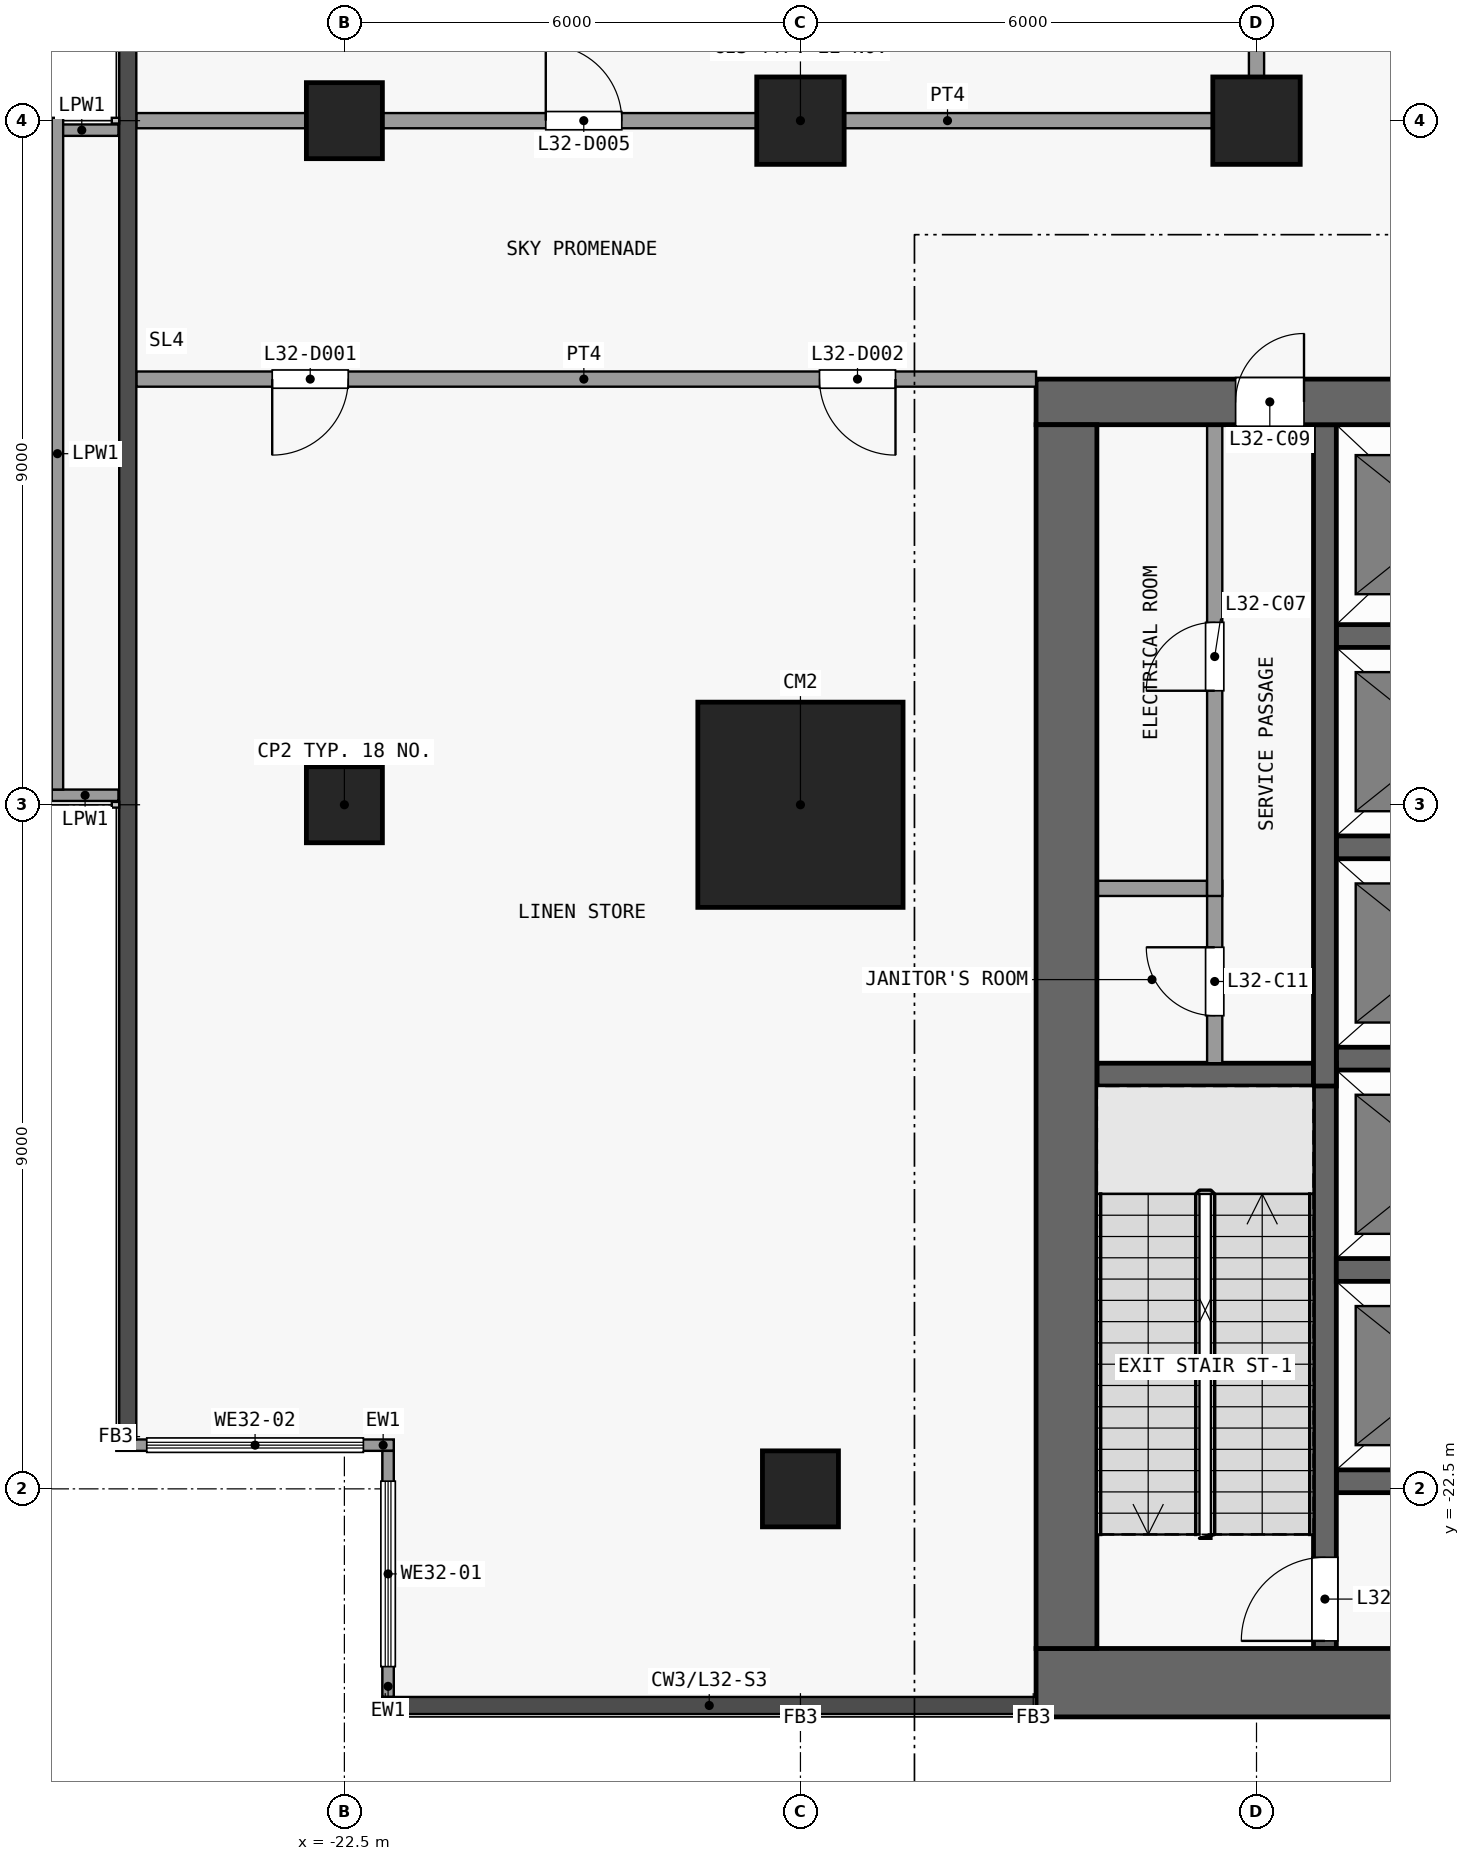
"""IFC4 building model, lengths in metres.
Left out: names, types, materials, properties, quantities, classifications, styles, units other than length and angle.
Written with IfcOpenShell. Run it as: python <this file> out.ifc"""

import sys

from ifc_helpers import new_model, si_unit, direction, frame, frame_2d, origin, origin_2d, place, context, subcontext, project, spatial, rectangle, extrude, element, fill, save


model = new_model("IFC4")
c1 = context("Model", 3, precision=1e-05, world=origin(), true_north=direction((0.0, 1.0)))
c2 = subcontext(c1, "Body", "Model", "MODEL_VIEW")
j1 = project(units=[si_unit("LENGTHUNIT", "METRE"), si_unit("PLANEANGLEUNIT", "RADIAN")], contexts=[c1])
p1 = place(None, origin())
s1 = spatial("IfcSite", under=j1, at=p1, CompositionType="ELEMENT")
p2 = place(p1, origin())
s2 = spatial("IfcBuilding", under=s1, at=p2, CompositionType="ELEMENT")
p3 = place(p2, frame((0.0, 0.0, 127.9)))
s3 = spatial("IfcBuildingStorey", under=s2, at=p3, CompositionType="ELEMENT", Elevation=127.9)
for number, where, z_axis, x_axis in (
    (1, (-22.5, -13.5, 0.0), (0.0, 0.0, 1.0), (1.0, 0.0, 0.0)),
    (2, (-22.5, -4.5, 0.0), (0.0, 0.0, 1.0), (1.0, 0.0, 0.0)),
    (3, (-16.5, -22.5, 0.0), (0.0, 0.0, 1.0), (1.0, 0.0, 0.0)),
):
    element("IfcColumn", number, at=place(p3, frame(where, z_axis=z_axis, x_axis=x_axis)), inside=s3, PredefinedType="COLUMN", context=c2, shape_type="SweptSolid", body=[
        extrude(rectangle(XDim=1.0, YDim=1.0, at=origin_2d()), origin(), (0.0, 0.0, 1.0), 6.0),
    ])
p4 = place(p3, frame((-16.5, -13.5, 0.0), z_axis=(0.0, 0.0, 1.0), x_axis=(1.0, 0.0, 0.0)))
e4 = element("IfcColumn", 4, at=p4, inside=s3, PredefinedType="COLUMN", context=c2, shape_type="SweptSolid", body=[
    extrude(rectangle(XDim=2.7, YDim=2.7, at=origin_2d()), origin(), (0.0, 0.0, 1.0), 6.0),
])
for number, where, z_axis, x_axis in (
    (5, (-16.5, -4.5, 0.0), (0.0, 0.0, 1.0), (1.0, 0.0, 0.0)),
    (6, (-10.5, -4.5, 0.0), (0.0, 0.0, 1.0), (1.0, 0.0, 0.0)),
):
    element("IfcColumn", number, at=place(p3, frame(where, z_axis=z_axis, x_axis=x_axis)), inside=s3, PredefinedType="COLUMN", context=c2, shape_type="SweptSolid", body=[
        extrude(rectangle(XDim=1.15, YDim=1.15, at=origin_2d()), origin(), (0.0, 0.0, 1.0), 6.0),
    ])
p5 = place(p3, frame((-13.4, -25.05, 0.0), z_axis=(0.0, 0.0, 1.0), x_axis=(1.0, 0.0, 0.0)))
e7 = element("IfcWall", 7, at=p5, inside=s3, PredefinedType="SHEAR", context=c2, shape_type="SweptSolid", body=[
    extrude(rectangle(XDim=26.8, YDim=0.9, at=frame_2d((13.4, 0.0))), origin(), (0.0, 0.0, 1.0), 5.7),
])
p6 = place(p3, frame((-13.4, -8.2, 0.0), z_axis=(0.0, 0.0, 1.0), x_axis=(1.0, 0.0, 0.0)))
e8 = element("IfcWall", 8, at=p6, inside=s3, PredefinedType="SHEAR", context=c2, shape_type="SweptSolid", body=[
    extrude(rectangle(XDim=26.8, YDim=0.6, at=frame_2d((13.4, 0.0))), origin(), (0.0, 0.0, 1.0), 5.7),
])
p7 = place(p6, frame((7.7, 0.0, 0.0)))
e9 = element("IfcOpeningElement", 9, at=p7, cuts=e8, PredefinedType="OPENING", context=c2, shape_type="SweptSolid", body=[
    extrude(rectangle(XDim=1.8, YDim=2.1, at=frame_2d((0.9, 1.05))), frame((0.0, 0.31, 0.0), z_axis=(0.0, -1.0, 0.0), x_axis=(1.0, 0.0, 0.0)), (0.0, 0.0, 1.0), 0.62),
])
p8 = place(p6, frame((17.3, 0.0, 0.0)))
e10 = element("IfcOpeningElement", 10, at=p8, cuts=e8, PredefinedType="OPENING", context=c2, shape_type="SweptSolid", body=[
    extrude(rectangle(XDim=1.8, YDim=2.1, at=frame_2d((0.9, 1.05))), frame((0.0, 0.31, 0.0), z_axis=(0.0, -1.0, 0.0), x_axis=(1.0, 0.0, 0.0)), (0.0, 0.0, 1.0), 0.62),
])
p9 = place(p6, frame((2.625, 0.0, 0.0)))
e11 = element("IfcOpeningElement", 11, at=p9, cuts=e8, PredefinedType="OPENING", context=c2, shape_type="SweptSolid", body=[
    extrude(rectangle(XDim=0.9, YDim=2.1, at=frame_2d((0.45, 1.05))), frame((0.0, 0.31, 0.0), z_axis=(0.0, -1.0, 0.0), x_axis=(1.0, 0.0, 0.0)), (0.0, 0.0, 1.0), 0.62),
])
p10 = place(p6, frame((23.275, 0.0, 0.0)))
e12 = element("IfcOpeningElement", 12, at=p10, cuts=e8, PredefinedType="OPENING", context=c2, shape_type="SweptSolid", body=[
    extrude(rectangle(XDim=0.9, YDim=2.1, at=frame_2d((0.45, 1.05))), frame((0.0, 0.31, 0.0), z_axis=(0.0, -1.0, 0.0), x_axis=(1.0, 0.0, 0.0)), (0.0, 0.0, 1.0), 0.62),
])
p11 = place(p3, frame((-13.0, -24.6, 0.0), z_axis=(0.0, 0.0, 1.0), x_axis=(0.0, 1.0, 0.0)))
e13 = element("IfcWall", 13, at=p11, inside=s3, PredefinedType="SHEAR", context=c2, shape_type="SweptSolid", body=[
    extrude(rectangle(XDim=16.1, YDim=0.8, at=frame_2d((8.05, 0.0))), origin(), (0.0, 0.0, 1.0), 5.7),
])
for number, where, z_axis, x_axis in (
    (14, (-9.45, -22.4, 0.0), (0.0, 0.0, 1.0), (1.0, 0.0, 0.0)),
    (15, (-9.45, -19.62, 0.0), (0.0, 0.0, 1.0), (1.0, 0.0, 0.0)),
):
    element("IfcWall", number, at=place(p3, frame(where, z_axis=z_axis, x_axis=x_axis)), inside=s3, PredefinedType="SHEAR", context=c2, shape_type="SweptSolid", body=[
        extrude(rectangle(XDim=2.8, YDim=0.3, at=frame_2d((1.4, 0.0))), origin(), (0.0, 0.0, 1.0), 5.7),
    ])
p12 = place(p3, frame((-12.6, -17.05, 0.0), z_axis=(0.0, 0.0, 1.0), x_axis=(1.0, 0.0, 0.0)))
e16 = element("IfcWall", 16, at=p12, inside=s3, PredefinedType="SHEAR", context=c2, shape_type="SweptSolid", body=[
    extrude(rectangle(XDim=2.85, YDim=0.3, at=frame_2d((1.425, 0.0))), origin(), (0.0, 0.0, 1.0), 5.7),
])
p13 = place(p3, frame((-9.45, -16.84, 0.0), z_axis=(0.0, 0.0, 1.0), x_axis=(1.0, 0.0, 0.0)))
e17 = element("IfcWall", 17, at=p13, inside=s3, PredefinedType="SHEAR", context=c2, shape_type="SweptSolid", body=[
    extrude(rectangle(XDim=2.8, YDim=0.3, at=frame_2d((1.4, 0.0))), origin(), (0.0, 0.0, 1.0), 5.7),
])
p14 = place(p3, frame((-12.6, -14.6, 0.0), z_axis=(0.0, 0.0, 1.0), x_axis=(1.0, 0.0, 0.0)))
e18 = element("IfcWall", 18, at=p14, inside=s3, PredefinedType="PARTITIONING", context=c2, shape_type="SweptSolid", body=[
    extrude(rectangle(XDim=1.45, YDim=0.2, at=frame_2d((0.725, 0.0))), origin(), (0.0, 0.0, 1.0), 5.7),
])
for number, where, z_axis, x_axis in (
    (19, (-9.45, -14.06, 0.0), (0.0, 0.0, 1.0), (1.0, 0.0, 0.0)),
    (20, (-9.45, -11.28, 0.0), (0.0, 0.0, 1.0), (1.0, 0.0, 0.0)),
):
    element("IfcWall", number, at=place(p3, frame(where, z_axis=z_axis, x_axis=x_axis)), inside=s3, PredefinedType="SHEAR", context=c2, shape_type="SweptSolid", body=[
        extrude(rectangle(XDim=2.8, YDim=0.3, at=frame_2d((1.4, 0.0))), origin(), (0.0, 0.0, 1.0), 5.7),
    ])
p15 = place(p3, frame((-11.05, -16.9, 0.0), z_axis=(0.0, 0.0, 1.0), x_axis=(0.0, 1.0, 0.0)))
e21 = element("IfcWall", 21, at=p15, inside=s3, PredefinedType="PARTITIONING", context=c2, shape_type="SweptSolid", body=[
    extrude(rectangle(XDim=2.4, YDim=0.2, at=frame_2d((1.2, 0.0))), origin(), (0.0, 0.0, 1.0), 5.7),
])
p16 = place(p15, frame((0.625, 0.0, 0.0)))
e22 = element("IfcOpeningElement", 22, at=p16, cuts=e21, PredefinedType="OPENING", context=c2, shape_type="SweptSolid", body=[
    extrude(rectangle(XDim=0.9, YDim=2.1, at=frame_2d((0.45, 1.05))), frame((0.0, 0.11, 0.0), z_axis=(0.0, -1.0, 0.0), x_axis=(1.0, 0.0, 0.0)), (0.0, 0.0, 1.0), 0.22),
])
p17 = place(p3, frame((-11.05, -14.7, 0.0), z_axis=(0.0, 0.0, 1.0), x_axis=(0.0, 1.0, 0.0)))
e23 = element("IfcWall", 23, at=p17, inside=s3, PredefinedType="PARTITIONING", context=c2, shape_type="SweptSolid", body=[
    extrude(rectangle(XDim=6.2, YDim=0.2, at=frame_2d((3.1, 0.0))), origin(), (0.0, 0.0, 1.0), 5.7),
])
p18 = place(p17, frame((2.7, 0.0, 0.0)))
e24 = element("IfcOpeningElement", 24, at=p18, cuts=e23, PredefinedType="OPENING", context=c2, shape_type="SweptSolid", body=[
    extrude(rectangle(XDim=0.9, YDim=2.1, at=frame_2d((0.45, 1.05))), frame((0.0, 0.11, 0.0), z_axis=(0.0, -1.0, 0.0), x_axis=(1.0, 0.0, 0.0)), (0.0, 0.0, 1.0), 0.22),
])
p19 = place(p3, frame((-9.6, -24.6, 0.0), z_axis=(0.0, 0.0, 1.0), x_axis=(0.0, 1.0, 0.0)))
e25 = element("IfcWall", 25, at=p19, inside=s3, PredefinedType="SHEAR", context=c2, shape_type="SweptSolid", body=[
    extrude(rectangle(XDim=7.7, YDim=0.3, at=frame_2d((3.85, 0.0))), origin(), (0.0, 0.0, 1.0), 5.7),
])
p20 = place(p19, frame((0.1, 0.0, 0.0)))
e26 = element("IfcOpeningElement", 26, at=p20, cuts=e25, PredefinedType="OPENING", context=c2, shape_type="SweptSolid", body=[
    extrude(rectangle(XDim=1.1, YDim=2.1, at=frame_2d((0.55, 1.05))), frame((0.0, 0.16, 0.0), z_axis=(0.0, -1.0, 0.0), x_axis=(1.0, 0.0, 0.0)), (0.0, 0.0, 1.0), 0.32),
])
p21 = place(p3, frame((-9.6, -17.2, 0.0), z_axis=(0.0, 0.0, 1.0), x_axis=(0.0, 1.0, 0.0)))
e27 = element("IfcWall", 27, at=p21, inside=s3, PredefinedType="SHEAR", context=c2, shape_type="SweptSolid", body=[
    extrude(rectangle(XDim=8.7, YDim=0.3, at=frame_2d((4.35, 0.0))), origin(), (0.0, 0.0, 1.0), 5.7),
])
p22 = place(p3, frame((-21.925, -25.238, 0.0), z_axis=(0.0, 0.0, 1.0), x_axis=(0.0, 1.0, 0.0)))
e28 = element("IfcWall", 28, at=p22, inside=s3, PredefinedType="SOLIDWALL", context=c2, shape_type="SweptSolid", body=[
    extrude(rectangle(XDim=3.238, YDim=0.15, at=frame_2d((1.619, 0.0))), origin(), (0.0, 0.0, 1.0), 5.7),
])
p23 = place(p22, frame((0.399, 0.0, 0.9)))
e29 = element("IfcOpeningElement", 29, at=p23, cuts=e28, PredefinedType="OPENING", context=c2, shape_type="SweptSolid", body=[
    extrude(rectangle(XDim=2.44, YDim=2.4, at=frame_2d((1.22, 1.2))), frame((0.0, 0.085, 0.0), z_axis=(0.0, -1.0, 0.0), x_axis=(1.0, 0.0, 0.0)), (0.0, 0.0, 1.0), 0.17),
])
p24 = place(p3, frame((-21.85, -21.925, 0.0), z_axis=(0.0, 0.0, 1.0), x_axis=(-1.0, 0.0, 0.0)))
e30 = element("IfcWall", 30, at=p24, inside=s3, PredefinedType="SOLIDWALL", context=c2, shape_type="SweptSolid", body=[
    extrude(rectangle(XDim=3.65, YDim=0.15, at=frame_2d((1.825, 0.0))), origin(), (0.0, 0.0, 1.0), 5.7),
])
p25 = place(p24, frame((0.4, 0.0, 0.9)))
e31 = element("IfcOpeningElement", 31, at=p25, cuts=e30, PredefinedType="OPENING", context=c2, shape_type="SweptSolid", body=[
    extrude(rectangle(XDim=2.85, YDim=2.4, at=frame_2d((1.425, 1.2))), frame((0.0, 0.085, 0.0), z_axis=(0.0, -1.0, 0.0), x_axis=(1.0, 0.0, 0.0)), (0.0, 0.0, 1.0), 0.17),
])
p26 = place(p3, frame((-26.438, -4.625, 0.0), z_axis=(0.0, 0.0, 1.0), x_axis=(1.0, 0.0, 0.0)))
e32 = element("IfcWall", 32, at=p26, inside=s3, PredefinedType="PARAPET", context=c2, shape_type="SweptSolid", body=[
    extrude(rectangle(XDim=0.965, YDim=0.15, at=frame_2d((0.482, 0.0))), origin(), (0.0, 0.0, 1.0), 1.15),
])
p27 = place(p3, frame((-25.472, -13.375, 0.0), z_axis=(0.0, 0.0, 1.0), x_axis=(-1.0, 0.0, 0.0)))
e33 = element("IfcWall", 33, at=p27, inside=s3, PredefinedType="PARAPET", context=c2, shape_type="SweptSolid", body=[
    extrude(rectangle(XDim=0.878, YDim=0.15, at=frame_2d((0.439, 0.0))), origin(), (0.0, 0.0, 1.0), 1.15),
])
p28 = place(p3, frame((-26.275, -13.3, 0.0), z_axis=(0.0, 0.0, 1.0), x_axis=(0.0, 1.0, 0.0)))
e34 = element("IfcWall", 34, at=p28, inside=s3, PredefinedType="PARAPET", context=c2, shape_type="SweptSolid", body=[
    extrude(rectangle(XDim=8.838, YDim=0.15, at=frame_2d((4.419, 0.0))), origin(), (0.0, 0.0, 1.0), 1.15),
])
p29 = place(p3, frame((-25.238, -7.9, 0.0), z_axis=(0.0, 0.0, 1.0), x_axis=(1.0, 0.0, 0.0)))
e35 = element("IfcWall", 35, at=p29, inside=s3, PredefinedType="PARTITIONING", context=c2, shape_type="SweptSolid", body=[
    extrude(rectangle(XDim=11.838, YDim=0.2, at=frame_2d((5.919, 0.0))), origin(), (0.0, 0.0, 1.0), 5.7),
])
p30 = place(p29, frame((1.788, 0.0, 0.0)))
e36 = element("IfcOpeningElement", 36, at=p30, cuts=e35, PredefinedType="OPENING", context=c2, shape_type="SweptSolid", body=[
    extrude(rectangle(XDim=1.0, YDim=2.1, at=frame_2d((0.5, 1.05))), frame((0.0, 0.11, 0.0), z_axis=(0.0, -1.0, 0.0), x_axis=(1.0, 0.0, 0.0)), (0.0, 0.0, 1.0), 0.22),
])
p31 = place(p29, frame((8.988, 0.0, 0.0)))
e37 = element("IfcOpeningElement", 37, at=p31, cuts=e35, PredefinedType="OPENING", context=c2, shape_type="SweptSolid", body=[
    extrude(rectangle(XDim=1.0, YDim=2.1, at=frame_2d((0.5, 1.05))), frame((0.0, 0.11, 0.0), z_axis=(0.0, -1.0, 0.0), x_axis=(1.0, 0.0, 0.0)), (0.0, 0.0, 1.0), 0.22),
])
p32 = place(p3, frame((-25.238, -4.5, 0.0), z_axis=(0.0, 0.0, 1.0), x_axis=(1.0, 0.0, 0.0)))
e38 = element("IfcWall", 38, at=p32, inside=s3, PredefinedType="PARTITIONING", context=c2, shape_type="SweptSolid", body=[
    extrude(rectangle(XDim=14.838, YDim=0.2, at=frame_2d((7.419, 0.0))), origin(), (0.0, 0.0, 1.0), 5.7),
])
p33 = place(p32, frame((5.387, 0.0, 0.0)))
e39 = element("IfcOpeningElement", 39, at=p33, cuts=e38, PredefinedType="OPENING", context=c2, shape_type="SweptSolid", body=[
    extrude(rectangle(XDim=1.0, YDim=2.1, at=frame_2d((0.5, 1.05))), frame((0.0, 0.11, 0.0), z_axis=(0.0, -1.0, 0.0), x_axis=(1.0, 0.0, 0.0)), (0.0, 0.0, 1.0), 0.22),
])
p34 = place(p3, frame((-10.5, -4.4, 0.0), z_axis=(0.0, 0.0, 1.0), x_axis=(0.0, 1.0, 0.0)))
e40 = element("IfcWall", 40, at=p34, inside=s3, PredefinedType="PARTITIONING", context=c2, shape_type="SweptSolid", body=[
    extrude(rectangle(XDim=11.8, YDim=0.2, at=frame_2d((5.9, 0.0))), origin(), (0.0, 0.0, 1.0), 5.7),
])
p35 = place(p18, origin())
e41 = element("IfcDoor", 41, at=p35, inside=s3, OperationType="SINGLE_SWING_LEFT", PredefinedType="DOOR", context=c2, shape_type="SweptSolid", body=[
    extrude(rectangle(XDim=0.9, YDim=2.1, at=frame_2d((0.45, 1.05))), frame((0.0, 0.025, 0.0), z_axis=(0.0, -1.0, 0.0), x_axis=(1.0, 0.0, 0.0)), (0.0, 0.0, 1.0), 0.05),
])
fill(e24, e41)
p36 = place(p9, origin())
e42 = element("IfcDoor", 42, at=p36, inside=s3, OperationType="SINGLE_SWING_RIGHT", PredefinedType="DOOR", context=c2, shape_type="SweptSolid", body=[
    extrude(rectangle(XDim=0.9, YDim=2.1, at=frame_2d((0.45, 1.05))), frame((0.0, 0.025, 0.0), z_axis=(0.0, -1.0, 0.0), x_axis=(1.0, 0.0, 0.0)), (0.0, 0.0, 1.0), 0.05),
])
fill(e11, e42)
p37 = place(p16, origin())
e43 = element("IfcDoor", 43, at=p37, inside=s3, OperationType="SINGLE_SWING_RIGHT", PredefinedType="DOOR", context=c2, shape_type="SweptSolid", body=[
    extrude(rectangle(XDim=0.9, YDim=2.1, at=frame_2d((0.45, 1.05))), frame((0.0, 0.025, 0.0), z_axis=(0.0, -1.0, 0.0), x_axis=(1.0, 0.0, 0.0)), (0.0, 0.0, 1.0), 0.05),
])
fill(e22, e43)
p38 = place(p20, origin())
e44 = element("IfcDoor", 44, at=p38, inside=s3, OperationType="SINGLE_SWING_LEFT", PredefinedType="DOOR", context=c2, shape_type="SweptSolid", body=[
    extrude(rectangle(XDim=1.1, YDim=2.1, at=frame_2d((0.55, 1.05))), frame((0.0, 0.025, 0.0), z_axis=(0.0, -1.0, 0.0), x_axis=(1.0, 0.0, 0.0)), (0.0, 0.0, 1.0), 0.05),
])
fill(e26, e44)
p39 = place(p23, origin())
e45 = element("IfcWindow", 45, at=p39, inside=s3, PartitioningType="SINGLE_PANEL", PredefinedType="WINDOW", context=c2, shape_type="SweptSolid", body=[
    extrude(rectangle(XDim=2.44, YDim=2.4, at=frame_2d((1.22, 1.2))), frame((0.0, 0.03, 0.0), z_axis=(0.0, -1.0, 0.0), x_axis=(1.0, 0.0, 0.0)), (0.0, 0.0, 1.0), 0.06),
])
fill(e29, e45)
p40 = place(p25, origin())
e46 = element("IfcWindow", 46, at=p40, inside=s3, PartitioningType="SINGLE_PANEL", PredefinedType="WINDOW", context=c2, shape_type="SweptSolid", body=[
    extrude(rectangle(XDim=2.85, YDim=2.4, at=frame_2d((1.425, 1.2))), frame((0.0, 0.03, 0.0), z_axis=(0.0, -1.0, 0.0), x_axis=(1.0, 0.0, 0.0)), (0.0, 0.0, 1.0), 0.06),
])
fill(e31, e46)
p41 = place(p30, origin())
e47 = element("IfcDoor", 47, at=p41, inside=s3, OperationType="SINGLE_SWING_LEFT", PredefinedType="DOOR", context=c2, shape_type="SweptSolid", body=[
    extrude(rectangle(XDim=1.0, YDim=2.1, at=frame_2d((0.5, 1.05))), frame((0.0, 0.025, 0.0), z_axis=(0.0, -1.0, 0.0), x_axis=(1.0, 0.0, 0.0)), (0.0, 0.0, 1.0), 0.05),
])
fill(e36, e47)
p42 = place(p31, origin())
e48 = element("IfcDoor", 48, at=p42, inside=s3, OperationType="SINGLE_SWING_RIGHT", PredefinedType="DOOR", context=c2, shape_type="SweptSolid", body=[
    extrude(rectangle(XDim=1.0, YDim=2.1, at=frame_2d((0.5, 1.05))), frame((0.0, 0.025, 0.0), z_axis=(0.0, -1.0, 0.0), x_axis=(1.0, 0.0, 0.0)), (0.0, 0.0, 1.0), 0.05),
])
fill(e37, e48)
p43 = place(p33, origin())
e49 = element("IfcDoor", 49, at=p43, inside=s3, OperationType="SINGLE_SWING_RIGHT", PredefinedType="DOOR", context=c2, shape_type="SweptSolid", body=[
    extrude(rectangle(XDim=1.0, YDim=2.1, at=frame_2d((0.5, 1.05))), frame((0.0, 0.025, 0.0), z_axis=(0.0, -1.0, 0.0), x_axis=(1.0, 0.0, 0.0)), (0.0, 0.0, 1.0), 0.05),
])
fill(e39, e49)
save(model, sys.argv[1])
